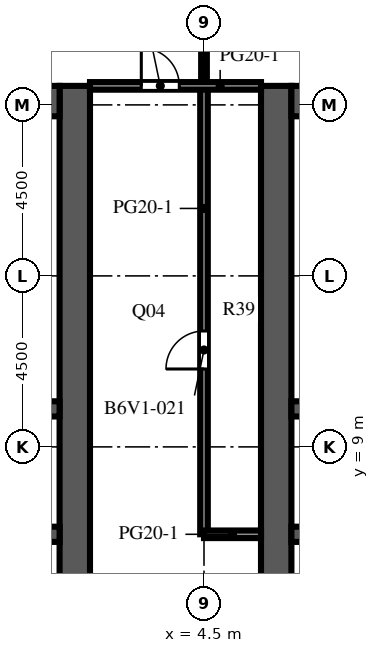
"""IFC4 building model, lengths in metres.
Left out: names, types, materials, properties, quantities, classifications, styles, units other than length and angle.
Written with IfcOpenShell. Run it as: python <this file> out.ifc"""

import sys

from ifc_helpers import new_model, si_unit, direction, frame, frame_2d, origin, place, context, subcontext, project, spatial, rectangle, extrude, element, fill, save


model = new_model("IFC4")
c1 = context("Model", 3, precision=1e-05, world=origin(), true_north=direction((0.0, 1.0)))
c2 = subcontext(c1, "Body", "Model", "MODEL_VIEW")
j1 = project(units=[si_unit("LENGTHUNIT", "METRE"), si_unit("PLANEANGLEUNIT", "RADIAN")], contexts=[c1])
p1 = place(None, origin())
s1 = spatial("IfcSite", under=j1, at=p1, CompositionType="ELEMENT")
p2 = place(p1, origin())
s2 = spatial("IfcBuilding", under=s1, at=p2, CompositionType="ELEMENT")
p3 = place(p2, frame((0.0, 0.0, 207.9)))
s3 = spatial("IfcBuildingStorey", under=s2, at=p3, CompositionType="ELEMENT", Elevation=207.9)
p4 = place(p3, frame((1.1, -9.0, 0.0), z_axis=(0.0, 0.0, 1.0), x_axis=(0.0, 1.0, 0.0)))
e1 = element("IfcWall", 1, at=p4, inside=s3, PredefinedType="SHEAR", context=c2, shape_type="SweptSolid", body=[
    extrude(rectangle(XDim=27.5, YDim=0.8, at=frame_2d((13.75, 0.0))), origin(), (0.0, 0.0, 1.0), 4.1),
])
p5 = place(p4, frame((12.55, 0.0, 0.0)))
e2 = element("IfcOpeningElement", 2, at=p5, cuts=e1, PredefinedType="OPENING", context=c2, shape_type="SweptSolid", body=[
    extrude(rectangle(XDim=2.4, YDim=2.4, at=frame_2d((1.2, 1.2))), frame((0.0, 0.41, 0.0), z_axis=(0.0, -1.0, 0.0), x_axis=(1.0, 0.0, 0.0)), (0.0, 0.0, 1.0), 0.82),
])
p6 = place(p4, frame((3.95, 0.0, 0.0)))
e3 = element("IfcOpeningElement", 3, at=p6, cuts=e1, PredefinedType="OPENING", context=c2, shape_type="SweptSolid", body=[
    extrude(rectangle(XDim=1.2, YDim=2.1, at=frame_2d((0.6, 1.05))), frame((0.0, 0.41, 0.0), z_axis=(0.0, -1.0, 0.0), x_axis=(1.0, 0.0, 0.0)), (0.0, 0.0, 1.0), 0.82),
])
p7 = place(p4, frame((22.35, 0.0, 0.0)))
e4 = element("IfcOpeningElement", 4, at=p7, cuts=e1, PredefinedType="OPENING", context=c2, shape_type="SweptSolid", body=[
    extrude(rectangle(XDim=1.2, YDim=2.1, at=frame_2d((0.6, 1.05))), frame((0.0, 0.41, 0.0), z_axis=(0.0, -1.0, 0.0), x_axis=(1.0, 0.0, 0.0)), (0.0, 0.0, 1.0), 0.82),
])
p8 = place(p3, frame((-9.7, 18.1, 0.0), z_axis=(0.0, 0.0, 1.0), x_axis=(1.0, 0.0, 0.0)))
e5 = element("IfcWall", 5, at=p8, inside=s3, PredefinedType="SHEAR", context=c2, shape_type="SweptSolid", body=[
    extrude(rectangle(XDim=10.4, YDim=0.8, at=frame_2d((5.2, 0.0))), origin(), (0.0, 0.0, 1.0), 4.1),
])
p9 = place(p3, frame((-9.7, 6.7, 0.0), z_axis=(0.0, 0.0, 1.0), x_axis=(1.0, 0.0, 0.0)))
e6 = element("IfcWall", 6, at=p9, inside=s3, PredefinedType="SHEAR", context=c2, shape_type="SweptSolid", body=[
    extrude(rectangle(XDim=10.4, YDim=0.4, at=frame_2d((5.2, 0.0))), origin(), (0.0, 0.0, 1.0), 4.1),
])
p10 = place(p9, frame((3.337, 0.0, 0.0)))
e7 = element("IfcOpeningElement", 7, at=p10, cuts=e6, PredefinedType="OPENING", context=c2, shape_type="SweptSolid", body=[
    extrude(rectangle(XDim=1.1, YDim=2.1, at=frame_2d((0.55, 1.05))), frame((0.0, 0.21, 0.0), z_axis=(0.0, -1.0, 0.0), x_axis=(1.0, 0.0, 0.0)), (0.0, 0.0, 1.0), 0.42),
])
p11 = place(p9, frame((5.962, 0.0, 0.0)))
e8 = element("IfcOpeningElement", 8, at=p11, cuts=e6, PredefinedType="OPENING", context=c2, shape_type="SweptSolid", body=[
    extrude(rectangle(XDim=1.1, YDim=2.1, at=frame_2d((0.55, 1.05))), frame((0.0, 0.21, 0.0), z_axis=(0.0, -1.0, 0.0), x_axis=(1.0, 0.0, 0.0)), (0.0, 0.0, 1.0), 0.42),
])
p12 = place(p9, frame((8.663, 0.0, 0.0)))
e9 = element("IfcOpeningElement", 9, at=p12, cuts=e6, PredefinedType="OPENING", context=c2, shape_type="SweptSolid", body=[
    extrude(rectangle(XDim=1.1, YDim=2.1, at=frame_2d((0.55, 1.05))), frame((0.0, 0.21, 0.0), z_axis=(0.0, -1.0, 0.0), x_axis=(1.0, 0.0, 0.0)), (0.0, 0.0, 1.0), 0.42),
])
p13 = place(p9, frame((0.688, 0.0, 0.0)))
e10 = element("IfcOpeningElement", 10, at=p13, cuts=e6, PredefinedType="OPENING", context=c2, shape_type="SweptSolid", body=[
    extrude(rectangle(XDim=1.0, YDim=2.1, at=frame_2d((0.5, 1.05))), frame((0.0, 0.21, 0.0), z_axis=(0.0, -1.0, 0.0), x_axis=(1.0, 0.0, 0.0)), (0.0, 0.0, 1.0), 0.42),
])
p14 = place(p3, frame((-9.7, 10.0, 0.0), z_axis=(0.0, 0.0, 1.0), x_axis=(1.0, 0.0, 0.0)))
e11 = element("IfcWall", 11, at=p14, inside=s3, PredefinedType="SHEAR", context=c2, shape_type="SweptSolid", body=[
    extrude(rectangle(XDim=10.4, YDim=0.4, at=frame_2d((5.2, 0.0))), origin(), (0.0, 0.0, 1.0), 4.1),
])
p15 = place(p3, frame((6.4, -9.0, 0.0), z_axis=(0.0, 0.0, 1.0), x_axis=(0.0, 1.0, 0.0)))
e12 = element("IfcWall", 12, at=p15, inside=s3, PredefinedType="SHEAR", context=c2, shape_type="SweptSolid", body=[
    extrude(rectangle(XDim=27.5, YDim=0.8, at=frame_2d((13.75, 0.0))), origin(), (0.0, 0.0, 1.0), 4.1),
])
p16 = place(p15, frame((12.55, 0.0, 0.0)))
e13 = element("IfcOpeningElement", 13, at=p16, cuts=e12, PredefinedType="OPENING", context=c2, shape_type="SweptSolid", body=[
    extrude(rectangle(XDim=2.4, YDim=2.4, at=frame_2d((1.2, 1.2))), frame((0.0, 0.41, 0.0), z_axis=(0.0, -1.0, 0.0), x_axis=(1.0, 0.0, 0.0)), (0.0, 0.0, 1.0), 0.82),
])
p17 = place(p15, frame((3.95, 0.0, 0.0)))
e14 = element("IfcOpeningElement", 14, at=p17, cuts=e12, PredefinedType="OPENING", context=c2, shape_type="SweptSolid", body=[
    extrude(rectangle(XDim=1.2, YDim=2.1, at=frame_2d((0.6, 1.05))), frame((0.0, 0.41, 0.0), z_axis=(0.0, -1.0, 0.0), x_axis=(1.0, 0.0, 0.0)), (0.0, 0.0, 1.0), 0.82),
])
p18 = place(p15, frame((22.35, 0.0, 0.0)))
e15 = element("IfcOpeningElement", 15, at=p18, cuts=e12, PredefinedType="OPENING", context=c2, shape_type="SweptSolid", body=[
    extrude(rectangle(XDim=1.2, YDim=2.1, at=frame_2d((0.6, 1.05))), frame((0.0, 0.41, 0.0), z_axis=(0.0, -1.0, 0.0), x_axis=(1.0, 0.0, 0.0)), (0.0, 0.0, 1.0), 0.82),
])
p19 = place(p3, frame((6.8, 18.1, 0.0), z_axis=(0.0, 0.0, 1.0), x_axis=(1.0, 0.0, 0.0)))
e16 = element("IfcWall", 16, at=p19, inside=s3, PredefinedType="SHEAR", context=c2, shape_type="SweptSolid", body=[
    extrude(rectangle(XDim=10.4, YDim=0.8, at=frame_2d((5.2, 0.0))), origin(), (0.0, 0.0, 1.0), 4.1),
])
p20 = place(p3, frame((6.8, 6.7, 0.0), z_axis=(0.0, 0.0, 1.0), x_axis=(1.0, 0.0, 0.0)))
e17 = element("IfcWall", 17, at=p20, inside=s3, PredefinedType="SHEAR", context=c2, shape_type="SweptSolid", body=[
    extrude(rectangle(XDim=10.4, YDim=0.4, at=frame_2d((5.2, 0.0))), origin(), (0.0, 0.0, 1.0), 4.1),
])
p21 = place(p20, frame((3.337, 0.0, 0.0)))
e18 = element("IfcOpeningElement", 18, at=p21, cuts=e17, PredefinedType="OPENING", context=c2, shape_type="SweptSolid", body=[
    extrude(rectangle(XDim=1.1, YDim=2.1, at=frame_2d((0.55, 1.05))), frame((0.0, 0.21, 0.0), z_axis=(0.0, -1.0, 0.0), x_axis=(1.0, 0.0, 0.0)), (0.0, 0.0, 1.0), 0.42),
])
p22 = place(p20, frame((5.962, 0.0, 0.0)))
e19 = element("IfcOpeningElement", 19, at=p22, cuts=e17, PredefinedType="OPENING", context=c2, shape_type="SweptSolid", body=[
    extrude(rectangle(XDim=1.1, YDim=2.1, at=frame_2d((0.55, 1.05))), frame((0.0, 0.21, 0.0), z_axis=(0.0, -1.0, 0.0), x_axis=(1.0, 0.0, 0.0)), (0.0, 0.0, 1.0), 0.42),
])
p23 = place(p20, frame((8.663, 0.0, 0.0)))
e20 = element("IfcOpeningElement", 20, at=p23, cuts=e17, PredefinedType="OPENING", context=c2, shape_type="SweptSolid", body=[
    extrude(rectangle(XDim=1.1, YDim=2.1, at=frame_2d((0.55, 1.05))), frame((0.0, 0.21, 0.0), z_axis=(0.0, -1.0, 0.0), x_axis=(1.0, 0.0, 0.0)), (0.0, 0.0, 1.0), 0.42),
])
p24 = place(p20, frame((0.688, 0.0, 0.0)))
e21 = element("IfcOpeningElement", 21, at=p24, cuts=e17, PredefinedType="OPENING", context=c2, shape_type="SweptSolid", body=[
    extrude(rectangle(XDim=1.0, YDim=2.1, at=frame_2d((0.5, 1.05))), frame((0.0, 0.21, 0.0), z_axis=(0.0, -1.0, 0.0), x_axis=(1.0, 0.0, 0.0)), (0.0, 0.0, 1.0), 0.42),
])
p25 = place(p3, frame((6.8, 10.0, 0.0), z_axis=(0.0, 0.0, 1.0), x_axis=(1.0, 0.0, 0.0)))
e22 = element("IfcWall", 22, at=p25, inside=s3, PredefinedType="SHEAR", context=c2, shape_type="SweptSolid", body=[
    extrude(rectangle(XDim=10.4, YDim=0.4, at=frame_2d((5.2, 0.0))), origin(), (0.0, 0.0, 1.0), 4.1),
])
p26 = place(p3, frame((4.5, 26.5, 0.0), z_axis=(0.0, 0.0, 1.0), x_axis=(0.0, -1.0, 0.0)))
e23 = element("IfcWall", 23, at=p26, inside=s3, PredefinedType="PARTITIONING", context=c2, shape_type="SweptSolid", body=[
    extrude(rectangle(XDim=8.0, YDim=0.15, at=frame_2d((4.0, 0.0))), origin(), (0.0, 0.0, 1.0), 3.65),
])
p27 = place(p26, frame((2.15, 0.0, 0.0)))
e24 = element("IfcOpeningElement", 24, at=p27, cuts=e23, PredefinedType="OPENING", context=c2, shape_type="SweptSolid", body=[
    extrude(rectangle(XDim=1.0, YDim=2.1, at=frame_2d((0.5, 1.05))), frame((0.0, 0.085, 0.0), z_axis=(0.0, -1.0, 0.0), x_axis=(1.0, 0.0, 0.0)), (0.0, 0.0, 1.0), 0.17),
])
p28 = place(p3, frame((4.5, 18.5, 0.0), z_axis=(0.0, 0.0, 1.0), x_axis=(0.0, -1.0, 0.0)))
e25 = element("IfcWall", 25, at=p28, inside=s3, PredefinedType="PARTITIONING", context=c2, shape_type="SweptSolid", body=[
    extrude(rectangle(XDim=11.8, YDim=0.2, at=frame_2d((5.9, 0.0))), origin(), (0.0, 0.0, 1.0), 3.65),
])
p29 = place(p28, frame((6.45, 0.0, 0.0)))
e26 = element("IfcOpeningElement", 26, at=p29, cuts=e25, PredefinedType="OPENING", context=c2, shape_type="SweptSolid", body=[
    extrude(rectangle(XDim=1.0, YDim=2.1, at=frame_2d((0.5, 1.05))), frame((0.0, 0.11, 0.0), z_axis=(0.0, -1.0, 0.0), x_axis=(1.0, 0.0, 0.0)), (0.0, 0.0, 1.0), 0.22),
])
p30 = place(p3, frame((4.5, 6.7, 0.0), z_axis=(0.0, 0.0, 1.0), x_axis=(1.0, 0.0, 0.0)))
e27 = element("IfcWall", 27, at=p30, inside=s3, PredefinedType="PARTITIONING", context=c2, shape_type="SweptSolid", body=[
    extrude(rectangle(XDim=1.5, YDim=0.2, at=frame_2d((0.75, 0.0))), origin(), (0.0, 0.0, 1.0), 3.65),
])
p31 = place(p3, frame((1.5, 18.5, 0.0), z_axis=(0.0, 0.0, 1.0), x_axis=(1.0, 0.0, 0.0)))
e28 = element("IfcWall", 28, at=p31, inside=s3, PredefinedType="PARTITIONING", context=c2, shape_type="SweptSolid", body=[
    extrude(rectangle(XDim=4.5, YDim=0.2, at=frame_2d((2.25, 0.0))), origin(), (0.0, 0.0, 1.0), 3.65),
])
p32 = place(p31, frame((1.35, 0.0, 0.0)))
e29 = element("IfcOpeningElement", 29, at=p32, cuts=e28, PredefinedType="OPENING", context=c2, shape_type="SweptSolid", body=[
    extrude(rectangle(XDim=1.0, YDim=2.1, at=frame_2d((0.5, 1.05))), frame((0.0, 0.11, 0.0), z_axis=(0.0, -1.0, 0.0), x_axis=(1.0, 0.0, 0.0)), (0.0, 0.0, 1.0), 0.22),
])
p33 = place(p5, origin())
e30 = element("IfcDoor", 30, at=p33, inside=s3, OperationType="DOUBLE_DOOR_DOUBLE_SWING", PredefinedType="DOOR", context=c2, shape_type="SweptSolid", body=[
    extrude(rectangle(XDim=2.4, YDim=2.4, at=frame_2d((1.2, 1.2))), frame((0.0, 0.025, 0.0), z_axis=(0.0, -1.0, 0.0), x_axis=(1.0, 0.0, 0.0)), (0.0, 0.0, 1.0), 0.05),
])
fill(e2, e30)
p34 = place(p16, origin())
e31 = element("IfcDoor", 31, at=p34, inside=s3, OperationType="DOUBLE_DOOR_DOUBLE_SWING", PredefinedType="DOOR", context=c2, shape_type="SweptSolid", body=[
    extrude(rectangle(XDim=2.4, YDim=2.4, at=frame_2d((1.2, 1.2))), frame((0.0, 0.025, 0.0), z_axis=(0.0, -1.0, 0.0), x_axis=(1.0, 0.0, 0.0)), (0.0, 0.0, 1.0), 0.05),
])
fill(e13, e31)
p35 = place(p7, origin())
e32 = element("IfcDoor", 32, at=p35, inside=s3, OperationType="SINGLE_SWING_LEFT", PredefinedType="DOOR", context=c2, shape_type="SweptSolid", body=[
    extrude(rectangle(XDim=1.2, YDim=2.1, at=frame_2d((0.6, 1.05))), frame((0.0, 0.375, 0.0), z_axis=(0.0, -1.0, 0.0), x_axis=(1.0, 0.0, 0.0)), (0.0, 0.0, 1.0), 0.05),
])
fill(e4, e32)
p36 = place(p18, origin())
e33 = element("IfcDoor", 33, at=p36, inside=s3, OperationType="SINGLE_SWING_RIGHT", PredefinedType="DOOR", context=c2, shape_type="SweptSolid", body=[
    extrude(rectangle(XDim=1.2, YDim=2.1, at=frame_2d((0.6, 1.05))), frame((0.0, -0.325, 0.0), z_axis=(0.0, -1.0, 0.0), x_axis=(1.0, 0.0, 0.0)), (0.0, 0.0, 1.0), 0.05),
])
fill(e15, e33)
p37 = place(p29, origin())
e34 = element("IfcDoor", 34, at=p37, inside=s3, OperationType="SINGLE_SWING_RIGHT", PredefinedType="DOOR", context=c2, shape_type="SweptSolid", body=[
    extrude(rectangle(XDim=1.0, YDim=2.1, at=frame_2d((0.5, 1.05))), frame((0.0, 0.025, 0.0), z_axis=(0.0, -1.0, 0.0), x_axis=(1.0, 0.0, 0.0)), (0.0, 0.0, 1.0), 0.05),
])
fill(e26, e34)
p38 = place(p32, origin())
e35 = element("IfcDoor", 35, at=p38, inside=s3, OperationType="SINGLE_SWING_LEFT", PredefinedType="DOOR", context=c2, shape_type="SweptSolid", body=[
    extrude(rectangle(XDim=1.0, YDim=2.1, at=frame_2d((0.5, 1.05))), frame((0.0, 0.025, 0.0), z_axis=(0.0, -1.0, 0.0), x_axis=(1.0, 0.0, 0.0)), (0.0, 0.0, 1.0), 0.05),
])
fill(e29, e35)
save(model, sys.argv[1])
